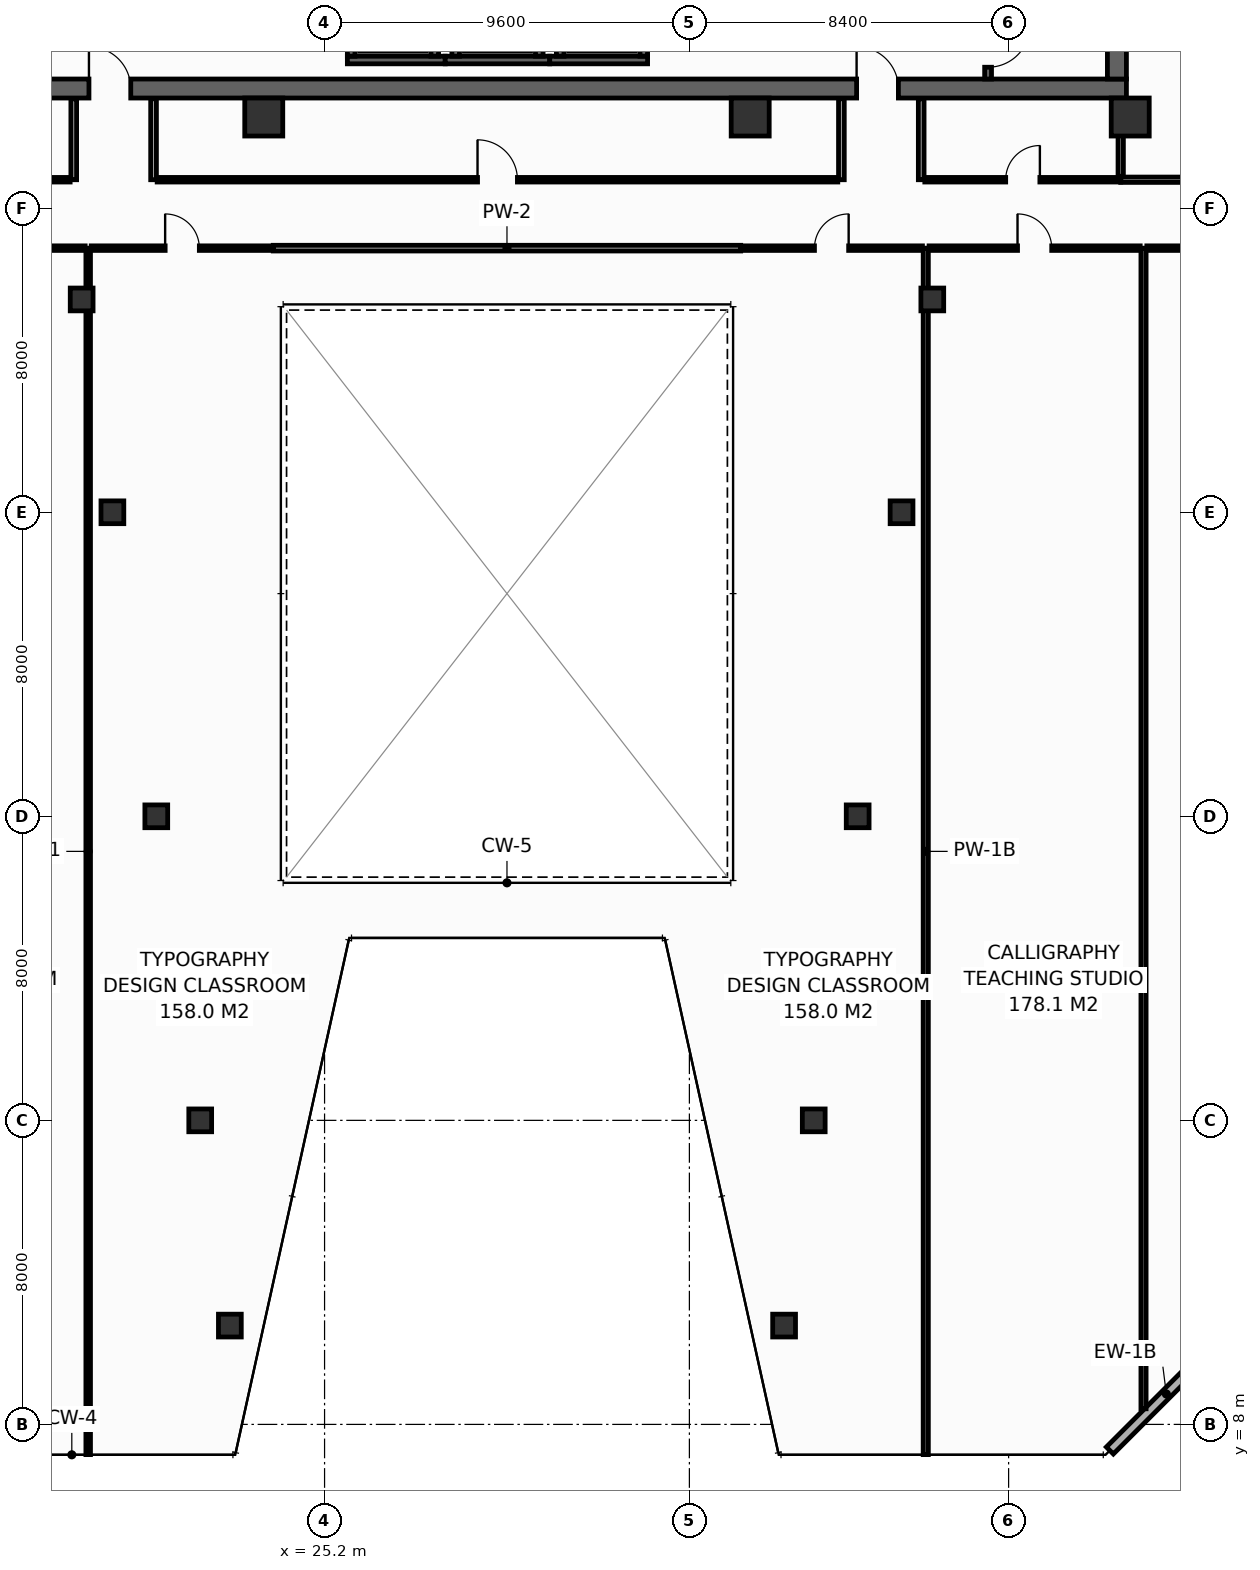
"""IFC4 building model, lengths in metres.
Left out: names, types, materials, properties, quantities, classifications, styles, units other than length and angle.
Written with IfcOpenShell. Run it as: python <this file> out.ifc"""

import sys

from ifc_helpers import new_model, si_unit, direction, frame, frame_2d, origin, origin_2d, place, context, subcontext, project, spatial, rectangle, hollow_rectangle, extrude, element, fill, save


model = new_model("IFC4")
c1 = context("Model", 3, precision=1e-05, world=origin(), true_north=direction((0.0, 1.0)))
c2 = subcontext(c1, "Body", "Model", "MODEL_VIEW")
j1 = project(units=[si_unit("LENGTHUNIT", "METRE"), si_unit("PLANEANGLEUNIT", "RADIAN")], contexts=[c1])
p1 = place(None, origin())
s1 = spatial("IfcSite", under=j1, at=p1, CompositionType="ELEMENT")
p2 = place(p1, origin())
s2 = spatial("IfcBuilding", under=s1, at=p2, CompositionType="ELEMENT")
p3 = place(p2, frame((0.0, 0.0, 129.6)))
s3 = spatial("IfcBuildingStorey", under=s2, at=p3, CompositionType="ELEMENT", Elevation=129.6)
p4 = place(p3, frame((13.6, 43.15, 0.0), z_axis=(0.0, 0.0, 1.0), x_axis=(1.0, 0.0, 0.0)))
e1 = element("IfcWall", 1, at=p4, inside=s3, PredefinedType="SHEAR", context=c2, shape_type="SweptSolid", body=[
    extrude(rectangle(XDim=32.7, YDim=0.5, at=frame_2d((16.35, 0.0))), origin(), (0.0, 0.0, 1.0), 3.55),
])
p5 = place(p4, frame((5.4, 0.0, 0.0)))
e2 = element("IfcOpeningElement", 2, at=p5, cuts=e1, PredefinedType="OPENING", context=c2, shape_type="SweptSolid", body=[
    extrude(rectangle(XDim=1.1, YDim=2.15, at=frame_2d((0.55, 1.075))), frame((0.0, 0.26, 0.0), z_axis=(0.0, -1.0, 0.0), x_axis=(1.0, 0.0, 0.0)), (0.0, 0.0, 1.0), 0.52),
])
p6 = place(p4, frame((25.6, 0.0, 0.0)))
e3 = element("IfcOpeningElement", 3, at=p6, cuts=e1, PredefinedType="OPENING", context=c2, shape_type="SweptSolid", body=[
    extrude(rectangle(XDim=1.1, YDim=2.15, at=frame_2d((0.55, 1.075))), frame((0.0, 0.26, 0.0), z_axis=(0.0, -1.0, 0.0), x_axis=(1.0, 0.0, 0.0)), (0.0, 0.0, 1.0), 0.52),
])
p7 = place(p3, frame((46.05, 43.4, 0.0), z_axis=(0.0, 0.0, 1.0), x_axis=(0.0, 1.0, 0.0)))
e4 = element("IfcWall", 4, at=p7, inside=s3, PredefinedType="SHEAR", context=c2, shape_type="SweptSolid", body=[
    extrude(rectangle(XDim=10.4, YDim=0.5, at=frame_2d((5.2, 0.0))), origin(), (0.0, 0.0, 1.0), 3.55),
])
for number, where, z_axis, x_axis in (
    (5, (23.6, 42.4, 0.0), (0.0, 0.0, 1.0), (1.0, 0.0, 0.0)),
    (6, (36.4, 42.4, 0.0), (0.0, 0.0, 1.0), (1.0, 0.0, 0.0)),
    (7, (46.4, 42.4, 0.0), (0.0, 0.0, 1.0), (1.0, 0.0, 0.0)),
):
    element("IfcColumn", number, at=place(p3, frame(where, z_axis=z_axis, x_axis=x_axis)), inside=s3, PredefinedType="COLUMN", context=c2, shape_type="SweptSolid", body=[
        extrude(hollow_rectangle(XDim=1.0, YDim=1.0, WallThickness=0.045, at=origin_2d()), origin(), (0.0, 0.0, 1.0), 3.8),
    ])
for number, where, z_axis, x_axis in (
    (8, (22.708, 10.6, 0.0), (0.0, 0.0, 1.0), (1.0, 0.0, 0.0)),
    (9, (37.292, 10.6, 0.0), (0.0, 0.0, 1.0), (1.0, 0.0, 0.0)),
    (10, (21.928, 16.0, 0.0), (0.0, 0.0, 1.0), (1.0, 0.0, 0.0)),
    (11, (38.072, 16.0, 0.0), (0.0, 0.0, 1.0), (1.0, 0.0, 0.0)),
    (12, (20.772, 24.0, 0.0), (0.0, 0.0, 1.0), (1.0, 0.0, 0.0)),
    (13, (39.228, 24.0, 0.0), (0.0, 0.0, 1.0), (1.0, 0.0, 0.0)),
    (14, (19.617, 32.0, 0.0), (0.0, 0.0, 1.0), (1.0, 0.0, 0.0)),
    (15, (40.383, 32.0, 0.0), (0.0, 0.0, 1.0), (1.0, 0.0, 0.0)),
    (16, (18.808, 37.6, 0.0), (0.0, 0.0, 1.0), (1.0, 0.0, 0.0)),
    (17, (41.192, 37.6, 0.0), (0.0, 0.0, 1.0), (1.0, 0.0, 0.0)),
):
    element("IfcColumn", number, at=place(p3, frame(where, z_axis=z_axis, x_axis=x_axis)), inside=s3, PredefinedType="COLUMN", context=c2, shape_type="SweptSolid", body=[
        extrude(hollow_rectangle(XDim=0.6, YDim=0.6, WallThickness=0.028, at=origin_2d()), origin(), (0.0, 0.0, 1.0), 3.8),
    ])
p8 = place(p3, frame((25.8, 43.9, 0.0), z_axis=(0.0, 0.0, 1.0), x_axis=(1.0, 0.0, 0.0)))
e18 = element("IfcWall", 18, at=p8, inside=s3, PredefinedType="SHEAR", context=c2, shape_type="SweptSolid", body=[
    extrude(rectangle(XDim=2.575, YDim=0.2, at=frame_2d((1.288, 0.0))), origin(), (0.0, 0.0, 1.0), 3.55),
])
for number, where, z_axis, x_axis in (
    (19, (25.9, 44.0, 0.0), (0.0, 0.0, 1.0), (0.0, 1.0, 0.0)),
    (20, (28.1, 44.0, 0.0), (0.0, 0.0, 1.0), (0.0, 1.0, 0.0)),
):
    element("IfcWall", number, at=place(p3, frame(where, z_axis=z_axis, x_axis=x_axis)), inside=s3, PredefinedType="SHEAR", context=c2, shape_type="SweptSolid", body=[
        extrude(rectangle(XDim=2.3, YDim=0.2, at=frame_2d((1.15, 0.0))), origin(), (0.0, 0.0, 1.0), 3.55),
    ])
p9 = place(p3, frame((28.375, 43.9, 0.0), z_axis=(0.0, 0.0, 1.0), x_axis=(1.0, 0.0, 0.0)))
e21 = element("IfcWall", 21, at=p9, inside=s3, PredefinedType="SHEAR", context=c2, shape_type="SweptSolid", body=[
    extrude(rectangle(XDim=2.75, YDim=0.2, at=frame_2d((1.375, 0.0))), origin(), (0.0, 0.0, 1.0), 3.55),
])
for number, where, z_axis, x_axis in (
    (22, (28.65, 44.0, 0.0), (0.0, 0.0, 1.0), (0.0, 1.0, 0.0)),
    (23, (30.85, 44.0, 0.0), (0.0, 0.0, 1.0), (0.0, 1.0, 0.0)),
):
    element("IfcWall", number, at=place(p3, frame(where, z_axis=z_axis, x_axis=x_axis)), inside=s3, PredefinedType="SHEAR", context=c2, shape_type="SweptSolid", body=[
        extrude(rectangle(XDim=2.3, YDim=0.2, at=frame_2d((1.15, 0.0))), origin(), (0.0, 0.0, 1.0), 3.55),
    ])
p10 = place(p3, frame((31.125, 43.9, 0.0), z_axis=(0.0, 0.0, 1.0), x_axis=(1.0, 0.0, 0.0)))
e24 = element("IfcWall", 24, at=p10, inside=s3, PredefinedType="SHEAR", context=c2, shape_type="SweptSolid", body=[
    extrude(rectangle(XDim=2.575, YDim=0.2, at=frame_2d((1.288, 0.0))), origin(), (0.0, 0.0, 1.0), 3.55),
])
for number, where, z_axis, x_axis in (
    (25, (31.4, 44.0, 0.0), (0.0, 0.0, 1.0), (0.0, 1.0, 0.0)),
    (26, (33.6, 44.0, 0.0), (0.0, 0.0, 1.0), (0.0, 1.0, 0.0)),
):
    element("IfcWall", number, at=place(p3, frame(where, z_axis=z_axis, x_axis=x_axis)), inside=s3, PredefinedType="SHEAR", context=c2, shape_type="SweptSolid", body=[
        extrude(rectangle(XDim=2.3, YDim=0.2, at=frame_2d((1.15, 0.0))), origin(), (0.0, 0.0, 1.0), 3.55),
    ])
p11 = place(p3, frame((42.66, 53.8, 0.0), z_axis=(0.0, 0.0, 1.0), x_axis=(0.0, -1.0, 0.0)))
e27 = element("IfcWall", 27, at=p11, inside=s3, PredefinedType="SHEAR", context=c2, shape_type="SweptSolid", body=[
    extrude(rectangle(XDim=10.4, YDim=0.18, at=frame_2d((5.2, 0.0))), origin(), (0.0, 0.0, 1.0), 3.55),
])
p12 = place(p11, frame((8.99, 0.0, 0.0)))
e28 = element("IfcOpeningElement", 28, at=p12, cuts=e27, PredefinedType="OPENING", context=c2, shape_type="SweptSolid", body=[
    extrude(rectangle(XDim=1.1, YDim=2.15, at=frame_2d((0.55, 1.075))), frame((0.0, 0.1, 0.0), z_axis=(0.0, -1.0, 0.0), x_axis=(1.0, 0.0, 0.0)), (0.0, 0.0, 1.0), 0.2),
])
p13 = place(p3, frame((45.864, 7.313, 0.0), z_axis=(0.0, 0.0, 1.0), x_axis=(0.70707775441, 0.707135806771, 0.0)))
e29 = element("IfcWall", 29, at=p13, inside=s3, PredefinedType="STANDARD", context=c2, shape_type="SweptSolid", body=[
    extrude(rectangle(XDim=4.206, YDim=0.26, at=frame_2d((2.103, 0.0))), origin(), (0.0, 0.0, 1.0), 3.55),
])
p14 = place(p3, frame((46.15, 40.75, 0.0), z_axis=(0.0, 0.0, 1.0), x_axis=(1.0, 0.0, 0.0)))
e30 = element("IfcWall", 30, at=p14, inside=s3, PredefinedType="PARTITIONING", context=c2, shape_type="SweptSolid", body=[
    extrude(rectangle(XDim=4.05, YDim=0.14, at=frame_2d((2.025, 0.0))), origin(), (0.0, 0.0, 1.0), 3.55),
])
p15 = place(p3, frame((46.15, 40.84, 0.0), z_axis=(0.0, 0.0, 1.0), x_axis=(0.0, 1.0, 0.0)))
e31 = element("IfcWall", 31, at=p15, inside=s3, PredefinedType="PARTITIONING", context=c2, shape_type="SweptSolid", body=[
    extrude(rectangle(XDim=2.04, YDim=0.14, at=frame_2d((1.02, 0.0))), origin(), (0.0, 0.0, 1.0), 3.55),
])
for number, where, z_axis, x_axis in (
    (32, (18.6, 40.75, 0.0), (0.0, 0.0, 1.0), (0.0, 1.0, 0.0)),
    (33, (20.7, 40.75, 0.0), (0.0, 0.0, 1.0), (0.0, 1.0, 0.0)),
    (34, (38.8, 40.75, 0.0), (0.0, 0.0, 1.0), (0.0, 1.0, 0.0)),
    (35, (40.9, 40.75, 0.0), (0.0, 0.0, 1.0), (0.0, 1.0, 0.0)),
):
    element("IfcWall", number, at=place(p3, frame(where, z_axis=z_axis, x_axis=x_axis)), inside=s3, PredefinedType="PARTITIONING", context=c2, shape_type="SweptSolid", body=[
        extrude(rectangle(XDim=2.13, YDim=0.15, at=frame_2d((1.065, 0.0))), origin(), (0.0, 0.0, 1.0), 3.55),
    ])
p16 = place(p3, frame((13.85, 40.75, 0.0), z_axis=(0.0, 0.0, 1.0), x_axis=(1.0, 0.0, 0.0)))
e36 = element("IfcWall", 36, at=p16, inside=s3, PredefinedType="PARTITIONING", context=c2, shape_type="SweptSolid", body=[
    extrude(rectangle(XDim=4.655, YDim=0.12, at=frame_2d((2.327, 0.0))), origin(), (0.0, 0.0, 1.0), 3.55),
])
p17 = place(p16, frame((1.802, 0.0, 0.0)))
e37 = element("IfcOpeningElement", 37, at=p17, cuts=e36, PredefinedType="OPENING", context=c2, shape_type="SweptSolid", body=[
    extrude(rectangle(XDim=1.05, YDim=2.15, at=frame_2d((0.525, 1.075))), frame((0.0, 0.07, 0.0), z_axis=(0.0, -1.0, 0.0), x_axis=(1.0, 0.0, 0.0)), (0.0, 0.0, 1.0), 0.14),
])
p18 = place(p3, frame((20.795, 40.75, 0.0), z_axis=(0.0, 0.0, 1.0), x_axis=(1.0, 0.0, 0.0)))
e38 = element("IfcWall", 38, at=p18, inside=s3, PredefinedType="PARTITIONING", context=c2, shape_type="SweptSolid", body=[
    extrude(rectangle(XDim=17.91, YDim=0.12, at=frame_2d((8.955, 0.0))), origin(), (0.0, 0.0, 1.0), 2.835),
])
p19 = place(p18, frame((8.43, 0.0, 0.0)))
e39 = element("IfcOpeningElement", 39, at=p19, cuts=e38, PredefinedType="OPENING", context=c2, shape_type="SweptSolid", body=[
    extrude(rectangle(XDim=1.05, YDim=2.15, at=frame_2d((0.525, 1.075))), frame((0.0, 0.07, 0.0), z_axis=(0.0, -1.0, 0.0), x_axis=(1.0, 0.0, 0.0)), (0.0, 0.0, 1.0), 0.14),
])
p20 = place(p3, frame((40.995, 40.75, 0.0), z_axis=(0.0, 0.0, 1.0), x_axis=(1.0, 0.0, 0.0)))
e40 = element("IfcWall", 40, at=p20, inside=s3, PredefinedType="PARTITIONING", context=c2, shape_type="SweptSolid", body=[
    extrude(rectangle(XDim=5.155, YDim=0.12, at=frame_2d((2.577, 0.0))), origin(), (0.0, 0.0, 1.0), 3.55),
])
p21 = place(p20, frame((2.128, 0.0, 0.0)))
e41 = element("IfcOpeningElement", 41, at=p21, cuts=e40, PredefinedType="OPENING", context=c2, shape_type="SweptSolid", body=[
    extrude(rectangle(XDim=0.9, YDim=2.1, at=frame_2d((0.45, 1.05))), frame((0.0, 0.07, 0.0), z_axis=(0.0, -1.0, 0.0), x_axis=(1.0, 0.0, 0.0)), (0.0, 0.0, 1.0), 0.14),
])
p22 = place(p3, frame((18.98, 7.205, 0.0), z_axis=(0.0, 0.0, 1.0), x_axis=(0.0, 1.0, 0.0)))
e42 = element("IfcWall", 42, at=p22, inside=s3, PredefinedType="PARTITIONING", context=c2, shape_type="SweptSolid", body=[
    extrude(rectangle(XDim=31.745, YDim=0.12, at=frame_2d((15.873, 0.0))), origin(), (0.0, 0.0, 1.0), 2.835),
])
p23 = place(p3, frame((41.02, 7.205, 0.0), z_axis=(0.0, 0.0, 1.0), x_axis=(0.0, 1.0, 0.0)))
e43 = element("IfcWall", 43, at=p23, inside=s3, PredefinedType="PARTITIONING", context=c2, shape_type="SweptSolid", body=[
    extrude(rectangle(XDim=31.745, YDim=0.135, at=frame_2d((15.873, 0.0))), origin(), (0.0, 0.0, 1.0), 2.835),
])
p24 = place(p3, frame((46.75, 8.411, 0.0), z_axis=(0.0, 0.0, 1.0), x_axis=(0.0, 1.0, 0.0)))
e44 = element("IfcWall", 44, at=p24, inside=s3, PredefinedType="PARTITIONING", context=c2, shape_type="SweptSolid", body=[
    extrude(rectangle(XDim=30.539, YDim=0.135, at=frame_2d((15.27, 0.0))), origin(), (0.0, 0.0, 1.0), 2.835),
])
p25 = place(p3, frame((13.33, 38.95, 0.0), z_axis=(0.0, 0.0, 1.0), x_axis=(1.0, 0.0, 0.0)))
e45 = element("IfcWall", 45, at=p25, inside=s3, PredefinedType="PARTITIONING", context=c2, shape_type="SweptSolid", body=[
    extrude(rectangle(XDim=5.57, YDim=0.12, at=frame_2d((2.785, 0.0))), origin(), (0.0, 0.0, 1.0), 3.55),
])
p26 = place(p25, frame((2.26, 0.0, 0.0)))
e46 = element("IfcOpeningElement", 46, at=p26, cuts=e45, PredefinedType="OPENING", context=c2, shape_type="SweptSolid", body=[
    extrude(rectangle(XDim=1.05, YDim=2.15, at=frame_2d((0.525, 1.075))), frame((0.0, 0.07, 0.0), z_axis=(0.0, -1.0, 0.0), x_axis=(1.0, 0.0, 0.0)), (0.0, 0.0, 1.0), 0.14),
])
p27 = place(p3, frame((19.06, 38.95, 0.0), z_axis=(0.0, 0.0, 1.0), x_axis=(1.0, 0.0, 0.0)))
e47 = element("IfcWall", 47, at=p27, inside=s3, PredefinedType="PARTITIONING", context=c2, shape_type="SweptSolid", body=[
    extrude(rectangle(XDim=4.79, YDim=0.12, at=frame_2d((2.395, 0.0))), origin(), (0.0, 0.0, 1.0), 2.835),
])
p28 = place(p27, frame((1.945, 0.0, 0.0)))
e48 = element("IfcOpeningElement", 48, at=p28, cuts=e47, PredefinedType="OPENING", context=c2, shape_type="SweptSolid", body=[
    extrude(rectangle(XDim=0.9, YDim=2.1, at=frame_2d((0.45, 1.05))), frame((0.0, 0.07, 0.0), z_axis=(0.0, -1.0, 0.0), x_axis=(1.0, 0.0, 0.0)), (0.0, 0.0, 1.0), 0.14),
])
p29 = place(p3, frame((23.85, 38.95, 0.0), z_axis=(0.0, 0.0, 1.0), x_axis=(1.0, 0.0, 0.0)))
e49 = element("IfcWall", 49, at=p29, inside=s3, PredefinedType="PARTITIONING", context=c2, shape_type="SweptSolid", body=[
    extrude(rectangle(XDim=12.3, YDim=0.15, at=frame_2d((6.15, 0.0))), origin(), (0.0, 0.0, 1.0), 3.55),
])
p30 = place(p3, frame((36.15, 38.95, 0.0), z_axis=(0.0, 0.0, 1.0), x_axis=(1.0, 0.0, 0.0)))
e50 = element("IfcWall", 50, at=p30, inside=s3, PredefinedType="PARTITIONING", context=c2, shape_type="SweptSolid", body=[
    extrude(rectangle(XDim=4.783, YDim=0.12, at=frame_2d((2.391, 0.0))), origin(), (0.0, 0.0, 1.0), 2.835),
])
p31 = place(p30, frame((1.941, 0.0, 0.0)))
e51 = element("IfcOpeningElement", 51, at=p31, cuts=e50, PredefinedType="OPENING", context=c2, shape_type="SweptSolid", body=[
    extrude(rectangle(XDim=0.9, YDim=2.1, at=frame_2d((0.45, 1.05))), frame((0.0, 0.07, 0.0), z_axis=(0.0, -1.0, 0.0), x_axis=(1.0, 0.0, 0.0)), (0.0, 0.0, 1.0), 0.14),
])
p32 = place(p3, frame((41.107, 38.95, 0.0), z_axis=(0.0, 0.0, 1.0), x_axis=(1.0, 0.0, 0.0)))
e52 = element("IfcWall", 52, at=p32, inside=s3, PredefinedType="PARTITIONING", context=c2, shape_type="SweptSolid", body=[
    extrude(rectangle(XDim=5.555, YDim=0.12, at=frame_2d((2.778, 0.0))), origin(), (0.0, 0.0, 1.0), 3.55),
])
p33 = place(p32, frame((2.327, 0.0, 0.0)))
e53 = element("IfcOpeningElement", 53, at=p33, cuts=e52, PredefinedType="OPENING", context=c2, shape_type="SweptSolid", body=[
    extrude(rectangle(XDim=0.9, YDim=2.1, at=frame_2d((0.45, 1.05))), frame((0.0, 0.07, 0.0), z_axis=(0.0, -1.0, 0.0), x_axis=(1.0, 0.0, 0.0)), (0.0, 0.0, 1.0), 0.14),
])
p34 = place(p3, frame((46.837, 38.95, 0.0), z_axis=(0.0, 0.0, 1.0), x_axis=(1.0, 0.0, 0.0)))
e54 = element("IfcWall", 54, at=p34, inside=s3, PredefinedType="PARTITIONING", context=c2, shape_type="SweptSolid", body=[
    extrude(rectangle(XDim=6.8, YDim=0.12, at=frame_2d((3.4, 0.0))), origin(), (0.0, 0.0, 1.0), 3.035),
])
p35 = place(p34, frame((2.95, 0.0, 0.0)))
e55 = element("IfcOpeningElement", 55, at=p35, cuts=e54, PredefinedType="OPENING", context=c2, shape_type="SweptSolid", body=[
    extrude(rectangle(XDim=0.9, YDim=2.1, at=frame_2d((0.45, 1.05))), frame((0.0, 0.07, 0.0), z_axis=(0.0, -1.0, 0.0), x_axis=(1.0, 0.0, 0.0)), (0.0, 0.0, 1.0), 0.14),
])
p36 = place(p12, origin())
e56 = element("IfcDoor", 56, at=p36, inside=s3, OperationType="SINGLE_SWING_LEFT", PredefinedType="DOOR", context=c2, shape_type="SweptSolid", body=[
    extrude(rectangle(XDim=1.1, YDim=2.15, at=frame_2d((0.55, 1.075))), frame((0.0, 0.025, 0.0), z_axis=(0.0, -1.0, 0.0), x_axis=(1.0, 0.0, 0.0)), (0.0, 0.0, 1.0), 0.05),
])
fill(e28, e56)
p37 = place(p5, origin())
e57 = element("IfcDoor", 57, at=p37, inside=s3, OperationType="SINGLE_SWING_LEFT", PredefinedType="DOOR", context=c2, shape_type="SweptSolid", body=[
    extrude(rectangle(XDim=1.1, YDim=2.15, at=frame_2d((0.55, 1.075))), frame((0.0, 0.025, 0.0), z_axis=(0.0, -1.0, 0.0), x_axis=(1.0, 0.0, 0.0)), (0.0, 0.0, 1.0), 0.05),
])
fill(e2, e57)
p38 = place(p6, origin())
e58 = element("IfcDoor", 58, at=p38, inside=s3, OperationType="SINGLE_SWING_LEFT", PredefinedType="DOOR", context=c2, shape_type="SweptSolid", body=[
    extrude(rectangle(XDim=1.1, YDim=2.15, at=frame_2d((0.55, 1.075))), frame((0.0, 0.025, 0.0), z_axis=(0.0, -1.0, 0.0), x_axis=(1.0, 0.0, 0.0)), (0.0, 0.0, 1.0), 0.05),
])
fill(e3, e58)
p39 = place(p19, origin())
e59 = element("IfcDoor", 59, at=p39, inside=s3, OperationType="SINGLE_SWING_LEFT", PredefinedType="DOOR", context=c2, shape_type="SweptSolid", body=[
    extrude(rectangle(XDim=1.05, YDim=2.15, at=frame_2d((0.525, 1.075))), frame((0.0, 0.025, 0.0), z_axis=(0.0, -1.0, 0.0), x_axis=(1.0, 0.0, 0.0)), (0.0, 0.0, 1.0), 0.05),
])
fill(e39, e59)
p40 = place(p21, origin())
e60 = element("IfcDoor", 60, at=p40, inside=s3, OperationType="SINGLE_SWING_RIGHT", PredefinedType="DOOR", context=c2, shape_type="SweptSolid", body=[
    extrude(rectangle(XDim=0.9, YDim=2.1, at=frame_2d((0.45, 1.05))), frame((0.0, 0.025, 0.0), z_axis=(0.0, -1.0, 0.0), x_axis=(1.0, 0.0, 0.0)), (0.0, 0.0, 1.0), 0.05),
])
fill(e41, e60)
p41 = place(p28, origin())
e61 = element("IfcDoor", 61, at=p41, inside=s3, OperationType="SINGLE_SWING_LEFT", PredefinedType="DOOR", context=c2, shape_type="SweptSolid", body=[
    extrude(rectangle(XDim=0.9, YDim=2.1, at=frame_2d((0.45, 1.05))), frame((0.0, 0.025, 0.0), z_axis=(0.0, -1.0, 0.0), x_axis=(1.0, 0.0, 0.0)), (0.0, 0.0, 1.0), 0.05),
])
fill(e48, e61)
p42 = place(p31, origin())
e62 = element("IfcDoor", 62, at=p42, inside=s3, OperationType="SINGLE_SWING_RIGHT", PredefinedType="DOOR", context=c2, shape_type="SweptSolid", body=[
    extrude(rectangle(XDim=0.9, YDim=2.1, at=frame_2d((0.45, 1.05))), frame((0.0, 0.025, 0.0), z_axis=(0.0, -1.0, 0.0), x_axis=(1.0, 0.0, 0.0)), (0.0, 0.0, 1.0), 0.05),
])
fill(e51, e62)
p43 = place(p33, origin())
e63 = element("IfcDoor", 63, at=p43, inside=s3, OperationType="SINGLE_SWING_LEFT", PredefinedType="DOOR", context=c2, shape_type="SweptSolid", body=[
    extrude(rectangle(XDim=0.9, YDim=2.1, at=frame_2d((0.45, 1.05))), frame((0.0, 0.025, 0.0), z_axis=(0.0, -1.0, 0.0), x_axis=(1.0, 0.0, 0.0)), (0.0, 0.0, 1.0), 0.05),
])
fill(e53, e63)
save(model, sys.argv[1])
